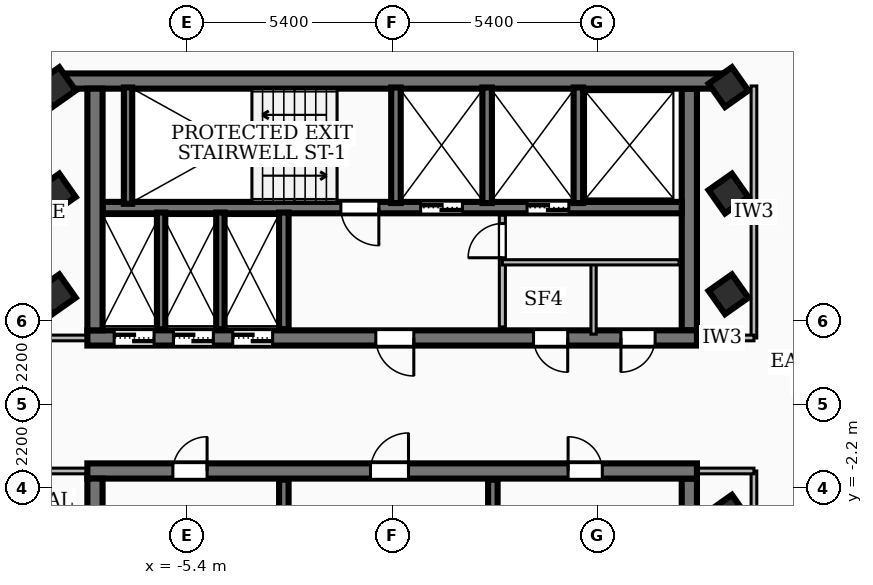
"""IFC4 building model, lengths in metres.
Left out: names, types, materials, properties, quantities, classifications, styles, units other than length and angle.
Written with IfcOpenShell. Run it as: python <this file> out.ifc"""

import sys

from ifc_helpers import new_model, si_unit, direction, frame, frame_2d, origin, origin_2d, place, context, subcontext, project, spatial, rectangle, extrude, element, fill, save


model = new_model("IFC4")
c1 = context("Model", 3, precision=1e-05, world=origin(), true_north=direction((0.0, 1.0)))
c2 = subcontext(c1, "Body", "Model", "MODEL_VIEW")
j1 = project(units=[si_unit("LENGTHUNIT", "METRE"), si_unit("PLANEANGLEUNIT", "RADIAN")], contexts=[c1])
p1 = place(None, origin())
s1 = spatial("IfcSite", under=j1, at=p1, CompositionType="ELEMENT")
p2 = place(p1, origin())
s2 = spatial("IfcBuilding", under=s1, at=p2, CompositionType="ELEMENT")
p3 = place(p2, frame((0.0, 0.0, 225.72)))
s3 = spatial("IfcBuildingStorey", under=s2, at=p3, CompositionType="ELEMENT", Elevation=225.72)
p4 = place(p3, frame((-8.78, 8.51, 0.0), z_axis=(0.0, 0.0, 1.0), x_axis=(1.0, 0.0, 0.0)))
e1 = element("IfcWall", 1, at=p4, inside=s3, PredefinedType="SHEAR", context=c2, shape_type="SweptSolid", body=[
    extrude(rectangle(XDim=17.56, YDim=0.4, at=frame_2d((8.78, 0.0))), origin(), (0.0, 0.0, 1.0), 3.14),
])
p5 = place(p3, frame((8.02, 1.75, 0.0), z_axis=(0.0, 0.0, 1.0), x_axis=(-1.0, 0.0, 0.0)))
e2 = element("IfcWall", 2, at=p5, inside=s3, PredefinedType="SHEAR", context=c2, shape_type="SweptSolid", body=[
    extrude(rectangle(XDim=16.04, YDim=0.4, at=frame_2d((8.02, 0.0))), origin(), (0.0, 0.0, 1.0), 3.14),
])
p6 = place(p5, frame((7.45, 0.0, 0.0)))
e3 = element("IfcOpeningElement", 3, at=p6, cuts=e2, PredefinedType="OPENING", context=c2, shape_type="SweptSolid", body=[
    extrude(rectangle(XDim=1.0, YDim=2.1, at=frame_2d((0.5, 1.05))), frame((0.0, 0.21, 0.0), z_axis=(0.0, -1.0, 0.0), x_axis=(1.0, 0.0, 0.0)), (0.0, 0.0, 1.0), 0.42),
])
p7 = place(p5, frame((14.285, 0.0, 0.0)))
e4 = element("IfcOpeningElement", 4, at=p7, cuts=e2, PredefinedType="OPENING", context=c2, shape_type="SweptSolid", body=[
    extrude(rectangle(XDim=1.05, YDim=2.15, at=frame_2d((0.525, 1.075))), frame((0.0, 0.21, 0.0), z_axis=(0.0, -1.0, 0.0), x_axis=(1.0, 0.0, 0.0)), (0.0, 0.0, 1.0), 0.42),
])
p8 = place(p5, frame((12.725, 0.0, 0.0)))
e5 = element("IfcOpeningElement", 5, at=p8, cuts=e2, PredefinedType="OPENING", context=c2, shape_type="SweptSolid", body=[
    extrude(rectangle(XDim=1.05, YDim=2.15, at=frame_2d((0.525, 1.075))), frame((0.0, 0.21, 0.0), z_axis=(0.0, -1.0, 0.0), x_axis=(1.0, 0.0, 0.0)), (0.0, 0.0, 1.0), 0.42),
])
p9 = place(p5, frame((11.165, 0.0, 0.0)))
e6 = element("IfcOpeningElement", 6, at=p9, cuts=e2, PredefinedType="OPENING", context=c2, shape_type="SweptSolid", body=[
    extrude(rectangle(XDim=1.05, YDim=2.15, at=frame_2d((0.525, 1.075))), frame((0.0, 0.21, 0.0), z_axis=(0.0, -1.0, 0.0), x_axis=(1.0, 0.0, 0.0)), (0.0, 0.0, 1.0), 0.42),
])
p10 = place(p5, frame((3.4, 0.0, 0.0)))
e7 = element("IfcOpeningElement", 7, at=p10, cuts=e2, PredefinedType="OPENING", context=c2, shape_type="SweptSolid", body=[
    extrude(rectangle(XDim=0.9, YDim=2.06, at=frame_2d((0.45, 1.03))), frame((0.0, 0.21, 0.0), z_axis=(0.0, -1.0, 0.0), x_axis=(1.0, 0.0, 0.0)), (0.0, 0.0, 1.0), 0.42),
])
p11 = place(p5, frame((1.1, 0.0, 0.0)))
e8 = element("IfcOpeningElement", 8, at=p11, cuts=e2, PredefinedType="OPENING", context=c2, shape_type="SweptSolid", body=[
    extrude(rectangle(XDim=0.9, YDim=2.06, at=frame_2d((0.45, 1.03))), frame((0.0, 0.21, 0.0), z_axis=(0.0, -1.0, 0.0), x_axis=(1.0, 0.0, 0.0)), (0.0, 0.0, 1.0), 0.42),
])
for number, where, z_axis, x_axis in (
    (9, (-7.82, 1.95, 0.0), (0.0, 0.0, 1.0), (0.0, 1.0, 0.0)),
    (10, (7.82, 8.31, 0.0), (0.0, 0.0, 1.0), (0.0, -1.0, 0.0)),
):
    element("IfcWall", number, at=place(p3, frame(where, z_axis=z_axis, x_axis=x_axis)), inside=s3, PredefinedType="SHEAR", context=c2, shape_type="SweptSolid", body=[
        extrude(rectangle(XDim=6.36, YDim=0.4, at=frame_2d((3.18, 0.0))), origin(), (0.0, 0.0, 1.0), 3.14),
    ])
p12 = place(p3, frame((7.62, 5.18, 0.0), z_axis=(0.0, 0.0, 1.0), x_axis=(-1.0, 0.0, 0.0)))
e11 = element("IfcWall", 11, at=p12, inside=s3, PredefinedType="SOLIDWALL", context=c2, shape_type="SweptSolid", body=[
    extrude(rectangle(XDim=15.24, YDim=0.3, at=frame_2d((7.62, 0.0))), origin(), (0.0, 0.0, 1.0), 3.14),
])
p13 = place(p12, frame((5.77, 0.0, 0.0)))
e12 = element("IfcOpeningElement", 12, at=p13, cuts=e11, PredefinedType="OPENING", context=c2, shape_type="SweptSolid", body=[
    extrude(rectangle(XDim=1.1, YDim=2.15, at=frame_2d((0.55, 1.075))), frame((0.0, 0.16, 0.0), z_axis=(0.0, -1.0, 0.0), x_axis=(1.0, 0.0, 0.0)), (0.0, 0.0, 1.0), 0.32),
])
p14 = place(p12, frame((2.97, 0.0, 0.0)))
e13 = element("IfcOpeningElement", 13, at=p14, cuts=e11, PredefinedType="OPENING", context=c2, shape_type="SweptSolid", body=[
    extrude(rectangle(XDim=1.1, YDim=2.15, at=frame_2d((0.55, 1.075))), frame((0.0, 0.16, 0.0), z_axis=(0.0, -1.0, 0.0), x_axis=(1.0, 0.0, 0.0)), (0.0, 0.0, 1.0), 0.32),
])
p15 = place(p12, frame((7.97, 0.0, 0.0)))
e14 = element("IfcOpeningElement", 14, at=p15, cuts=e11, PredefinedType="OPENING", context=c2, shape_type="SweptSolid", body=[
    extrude(rectangle(XDim=1.0, YDim=2.1, at=frame_2d((0.5, 1.05))), frame((0.0, 0.16, 0.0), z_axis=(0.0, -1.0, 0.0), x_axis=(1.0, 0.0, 0.0)), (0.0, 0.0, 1.0), 0.32),
])
p16 = place(p3, frame((-8.02, -1.75, 0.0), z_axis=(0.0, 0.0, 1.0), x_axis=(1.0, 0.0, 0.0)))
e15 = element("IfcWall", 15, at=p16, inside=s3, PredefinedType="SHEAR", context=c2, shape_type="SweptSolid", body=[
    extrude(rectangle(XDim=16.04, YDim=0.4, at=frame_2d((8.02, 0.0))), origin(), (0.0, 0.0, 1.0), 3.14),
])
p17 = place(p16, frame((7.45, 0.0, 0.0)))
e16 = element("IfcOpeningElement", 16, at=p17, cuts=e15, PredefinedType="OPENING", context=c2, shape_type="SweptSolid", body=[
    extrude(rectangle(XDim=1.0, YDim=2.1, at=frame_2d((0.5, 1.05))), frame((0.0, 0.21, 0.0), z_axis=(0.0, -1.0, 0.0), x_axis=(1.0, 0.0, 0.0)), (0.0, 0.0, 1.0), 0.42),
])
p18 = place(p16, frame((12.65, 0.0, 0.0)))
e17 = element("IfcOpeningElement", 17, at=p18, cuts=e15, PredefinedType="OPENING", context=c2, shape_type="SweptSolid", body=[
    extrude(rectangle(XDim=0.9, YDim=2.06, at=frame_2d((0.45, 1.03))), frame((0.0, 0.21, 0.0), z_axis=(0.0, -1.0, 0.0), x_axis=(1.0, 0.0, 0.0)), (0.0, 0.0, 1.0), 0.42),
])
p19 = place(p16, frame((2.25, 0.0, 0.0)))
e18 = element("IfcOpeningElement", 18, at=p19, cuts=e15, PredefinedType="OPENING", context=c2, shape_type="SweptSolid", body=[
    extrude(rectangle(XDim=0.9, YDim=2.06, at=frame_2d((0.45, 1.03))), frame((0.0, 0.21, 0.0), z_axis=(0.0, -1.0, 0.0), x_axis=(1.0, 0.0, 0.0)), (0.0, 0.0, 1.0), 0.42),
])
for number, where, z_axis, x_axis in (
    (19, (-7.82, -8.31, 0.0), (0.0, 0.0, 1.0), (0.0, 1.0, 0.0)),
    (20, (7.82, -1.95, 0.0), (0.0, 0.0, 1.0), (0.0, -1.0, 0.0)),
):
    element("IfcWall", number, at=place(p3, frame(where, z_axis=z_axis, x_axis=x_axis)), inside=s3, PredefinedType="SHEAR", context=c2, shape_type="SweptSolid", body=[
        extrude(rectangle(XDim=6.36, YDim=0.4, at=frame_2d((3.18, 0.0))), origin(), (0.0, 0.0, 1.0), 3.14),
    ])
p20 = place(p3, frame((-6.95, 5.28, 0.0), z_axis=(0.0, 0.0, 1.0), x_axis=(0.0, 1.0, 0.0)))
e21 = element("IfcWall", 21, at=p20, inside=s3, PredefinedType="SOLIDWALL", context=c2, shape_type="SweptSolid", body=[
    extrude(rectangle(XDim=3.06, YDim=0.22, at=frame_2d((1.53, 0.0))), origin(), (0.0, 0.0, 1.0), 3.14),
])
for number, where, z_axis, x_axis in (
    (22, (0.1, 5.3, 0.0), (0.0, 0.0, 1.0), (0.0, 1.0, 0.0)),
    (23, (2.5, 5.3, 0.0), (0.0, 0.0, 1.0), (0.0, 1.0, 0.0)),
    (24, (4.9, 5.3, 0.0), (0.0, 0.0, 1.0), (0.0, 1.0, 0.0)),
):
    element("IfcWall", number, at=place(p3, frame(where, z_axis=z_axis, x_axis=x_axis)), inside=s3, PredefinedType="SOLIDWALL", context=c2, shape_type="SweptSolid", body=[
        extrude(rectangle(XDim=3.04, YDim=0.25, at=frame_2d((1.52, 0.0))), origin(), (0.0, 0.0, 1.0), 3.14),
    ])
for number, where, z_axis, x_axis in (
    (25, (-2.85, 1.98, 0.0), (0.0, 0.0, 1.0), (0.0, 1.0, 0.0)),
    (26, (-2.85, -5.05, 0.0), (0.0, 0.0, 1.0), (0.0, 1.0, 0.0)),
    (27, (2.65, -5.05, 0.0), (0.0, 0.0, 1.0), (0.0, 1.0, 0.0)),
):
    element("IfcWall", number, at=place(p3, frame(where, z_axis=z_axis, x_axis=x_axis)), inside=s3, PredefinedType="SOLIDWALL", context=c2, shape_type="SweptSolid", body=[
        extrude(rectangle(XDim=3.07, YDim=0.25, at=frame_2d((1.535, 0.0))), origin(), (0.0, 0.0, 1.0), 3.14),
    ])
for number, where, z_axis, x_axis in (
    (28, (-6.08, 1.98, 0.0), (0.0, 0.0, 1.0), (0.0, 1.0, 0.0)),
    (29, (-4.52, 1.98, 0.0), (0.0, 0.0, 1.0), (0.0, 1.0, 0.0)),
):
    element("IfcWall", number, at=place(p3, frame(where, z_axis=z_axis, x_axis=x_axis)), inside=s3, PredefinedType="SOLIDWALL", context=c2, shape_type="SweptSolid", body=[
        extrude(rectangle(XDim=3.07, YDim=0.22, at=frame_2d((1.535, 0.0))), origin(), (0.0, 0.0, 1.0), 3.14),
    ])
for number, where, z_axis, x_axis in (
    (30, (-8.85, -2.9, 0.0), (0.0, 0.0, 1.0), (0.817, 0.576, 0.0)),
    (31, (-8.85, 2.9, 0.0), (0.0, 0.0, 1.0), (0.817, 0.576, 0.0)),
    (32, (-8.85, 5.55, 0.0), (0.0, 0.0, 1.0), (0.817, 0.576, 0.0)),
    (33, (8.85, -2.9, 0.0), (0.0, 0.0, 1.0), (0.817, 0.576, 0.0)),
    (34, (8.85, 2.9, 0.0), (0.0, 0.0, 1.0), (0.817, 0.576, 0.0)),
    (35, (8.85, 5.55, 0.0), (0.0, 0.0, 1.0), (0.817, 0.576, 0.0)),
    (36, (-8.85, 8.35, 0.0), (0.0, 0.0, 1.0), (0.817, 0.576, 0.0)),
    (37, (8.85, 8.35, 0.0), (0.0, 0.0, 1.0), (0.817, 0.576, 0.0)),
):
    element("IfcColumn", number, at=place(p3, frame(where, z_axis=z_axis, x_axis=x_axis)), inside=s3, PredefinedType="COLUMN", context=c2, shape_type="SweptSolid", body=[
        extrude(rectangle(XDim=0.75, YDim=0.75, at=origin_2d()), origin(), (0.0, 0.0, 1.0), 3.42),
    ])
p21 = place(p3, frame((-4.337, -18.921, 0.0), z_axis=(0.0, 0.0, 1.0), x_axis=(-0.576413609547, 0.817158094085, 0.0)))
e38 = element("IfcWall", 38, at=p21, inside=s3, PredefinedType="SOLIDWALL", context=c2, shape_type="SweptSolid", body=[
    extrude(rectangle(XDim=25.923, YDim=0.2, at=frame_2d((12.961, 0.0))), origin(), (0.0, 0.0, 1.0), 3.14),
])
p22 = place(p21, frame((19.02, 0.0, 0.85)))
e39 = element("IfcOpeningElement", 39, at=p22, cuts=e38, PredefinedType="OPENING", context=c2, shape_type="SweptSolid", body=[
    extrude(rectangle(XDim=2.4, YDim=1.65, at=frame_2d((1.2, 0.825))), frame((0.0, 0.11, 0.0), z_axis=(0.0, -1.0, 0.0), x_axis=(1.0, 0.0, 0.0)), (0.0, 0.0, 1.0), 0.22),
])
p23 = place(p3, frame((2.9, 2.04, 0.0), z_axis=(0.0, 0.0, 1.0), x_axis=(0.0, 1.0, 0.0)))
e40 = element("IfcWall", 40, at=p23, inside=s3, PredefinedType="PARTITIONING", context=c2, shape_type="SweptSolid", body=[
    extrude(rectangle(XDim=2.94, YDim=0.16, at=frame_2d((1.47, 0.0))), origin(), (0.0, 0.0, 1.0), 2.37),
])
p24 = place(p23, frame((1.82, 0.0, 0.0)))
e41 = element("IfcOpeningElement", 41, at=p24, cuts=e40, PredefinedType="OPENING", context=c2, shape_type="SweptSolid", body=[
    extrude(rectangle(XDim=0.9, YDim=2.06, at=frame_2d((0.45, 1.03))), frame((0.0, 0.09, 0.0), z_axis=(0.0, -1.0, 0.0), x_axis=(1.0, 0.0, 0.0)), (0.0, 0.0, 1.0), 0.18),
])
p25 = place(p3, frame((2.9, 3.74, 0.0), z_axis=(0.0, 0.0, 1.0), x_axis=(1.0, 0.0, 0.0)))
e42 = element("IfcWall", 42, at=p25, inside=s3, PredefinedType="PARTITIONING", context=c2, shape_type="SweptSolid", body=[
    extrude(rectangle(XDim=4.65, YDim=0.138, at=frame_2d((2.325, 0.0))), origin(), (0.0, 0.0, 1.0), 3.14),
])
p26 = place(p3, frame((5.3, 1.85, 0.0), z_axis=(0.0, 0.0, 1.0), x_axis=(0.0, 1.0, 0.0)))
e43 = element("IfcWall", 43, at=p26, inside=s3, PredefinedType="PARTITIONING", context=c2, shape_type="SweptSolid", body=[
    extrude(rectangle(XDim=1.89, YDim=0.138, at=frame_2d((0.945, 0.0))), origin(), (0.0, 0.0, 1.0), 2.37),
])
for number, where, z_axis, x_axis in (
    (44, (-7.85, 1.75, 0.0), (0.0, 0.0, 1.0), (-1.0, 0.0, 0.0)),
    (45, (-7.85, -1.75, 0.0), (0.0, 0.0, 1.0), (-1.0, 0.0, 0.0)),
):
    element("IfcWall", number, at=place(p3, frame(where, z_axis=z_axis, x_axis=x_axis)), inside=s3, PredefinedType="PARTITIONING", context=c2, shape_type="SweptSolid", body=[
        extrude(rectangle(XDim=1.67, YDim=0.15, at=frame_2d((0.835, 0.0))), origin(), (0.0, 0.0, 1.0), 2.37),
    ])
p27 = place(p3, frame((9.52, 1.75, 0.0), z_axis=(0.0, 0.0, 1.0), x_axis=(0.0, 1.0, 0.0)))
e46 = element("IfcWall", 46, at=p27, inside=s3, PredefinedType="PARTITIONING", context=c2, shape_type="SweptSolid", body=[
    extrude(rectangle(XDim=6.63, YDim=0.15, at=frame_2d((3.315, 0.0))), origin(), (0.0, 0.0, 1.0), 2.51),
])
p28 = place(p3, frame((7.85, 1.75, 0.0), z_axis=(0.0, 0.0, 1.0), x_axis=(1.0, 0.0, 0.0)))
e47 = element("IfcWall", 47, at=p28, inside=s3, PredefinedType="PARTITIONING", context=c2, shape_type="SweptSolid", body=[
    extrude(rectangle(XDim=1.67, YDim=0.15, at=frame_2d((0.835, 0.0))), origin(), (0.0, 0.0, 1.0), 2.37),
])
p29 = place(p3, frame((9.52, -8.38, 0.0), z_axis=(0.0, 0.0, 1.0), x_axis=(0.0, 1.0, 0.0)))
e48 = element("IfcWall", 48, at=p29, inside=s3, PredefinedType="PARTITIONING", context=c2, shape_type="SweptSolid", body=[
    extrude(rectangle(XDim=6.63, YDim=0.15, at=frame_2d((3.315, 0.0))), origin(), (0.0, 0.0, 1.0), 3.14),
])
p30 = place(p3, frame((7.85, -1.75, 0.0), z_axis=(0.0, 0.0, 1.0), x_axis=(1.0, 0.0, 0.0)))
e49 = element("IfcWall", 49, at=p30, inside=s3, PredefinedType="PARTITIONING", context=c2, shape_type="SweptSolid", body=[
    extrude(rectangle(XDim=1.67, YDim=0.15, at=frame_2d((0.835, 0.0))), origin(), (0.0, 0.0, 1.0), 2.37),
])
p31 = place(p3, frame((10.215, 14.836, 0.0), z_axis=(0.0, 0.0, 1.0), x_axis=(0.576525296339, -0.817079300118, 0.0)))
e50 = element("IfcWall", 50, at=p31, inside=s3, PredefinedType="PARTITIONING", context=c2, shape_type="SweptSolid", body=[
    extrude(rectangle(XDim=12.87, YDim=0.11, at=frame_2d((6.435, 0.0))), origin(), (0.0, 0.0, 1.0), 2.51),
])
p32 = place(p31, frame((6.155, 0.0, 0.0)))
e51 = element("IfcOpeningElement", 51, at=p32, cuts=e50, PredefinedType="OPENING", context=c2, shape_type="SweptSolid", body=[
    extrude(rectangle(XDim=0.86, YDim=2.04, at=frame_2d((0.43, 1.02))), frame((0.0, 0.065, 0.0), z_axis=(0.0, -1.0, 0.0), x_axis=(1.0, 0.0, 0.0)), (0.0, 0.0, 1.0), 0.13),
])
p33 = place(p31, frame((4.955, 0.0, 0.0)))
e52 = element("IfcOpeningElement", 52, at=p33, cuts=e50, PredefinedType="OPENING", context=c2, shape_type="SweptSolid", body=[
    extrude(rectangle(XDim=0.86, YDim=2.04, at=frame_2d((0.43, 1.02))), frame((0.0, 0.065, 0.0), z_axis=(0.0, -1.0, 0.0), x_axis=(1.0, 0.0, 0.0)), (0.0, 0.0, 1.0), 0.13),
])
p34 = place(p3, frame((-16.752, 5.671, 0.0), z_axis=(0.0, 0.0, 1.0), x_axis=(0.81715881447, 0.576412588285, 0.0)))
e53 = element("IfcWall", 53, at=p34, inside=s3, PredefinedType="PARTITIONING", context=c2, shape_type="SweptSolid", body=[
    extrude(rectangle(XDim=20.44, YDim=0.11, at=frame_2d((10.22, 0.0))), origin(), (0.0, 0.0, 1.0), 2.51),
])
p35 = place(p34, frame((9.82, 0.0, 0.0)))
e54 = element("IfcOpeningElement", 54, at=p35, cuts=e53, PredefinedType="OPENING", context=c2, shape_type="SweptSolid", body=[
    extrude(rectangle(XDim=1.2, YDim=2.1, at=frame_2d((0.6, 1.05))), frame((0.0, 0.065, 0.0), z_axis=(0.0, -1.0, 0.0), x_axis=(1.0, 0.0, 0.0)), (0.0, 0.0, 1.0), 0.13),
])
p36 = place(p6, origin())
e55 = element("IfcDoor", 55, at=p36, inside=s3, OperationType="SINGLE_SWING_LEFT", PredefinedType="DOOR", context=c2, shape_type="SweptSolid", body=[
    extrude(rectangle(XDim=1.0, YDim=2.1, at=frame_2d((0.5, 1.05))), frame((0.0, 0.025, 0.0), z_axis=(0.0, -1.0, 0.0), x_axis=(1.0, 0.0, 0.0)), (0.0, 0.0, 1.0), 0.05),
])
fill(e3, e55)
p37 = place(p17, origin())
e56 = element("IfcDoor", 56, at=p37, inside=s3, OperationType="SINGLE_SWING_RIGHT", PredefinedType="DOOR", context=c2, shape_type="SweptSolid", body=[
    extrude(rectangle(XDim=1.0, YDim=2.1, at=frame_2d((0.5, 1.05))), frame((0.0, 0.025, 0.0), z_axis=(0.0, -1.0, 0.0), x_axis=(1.0, 0.0, 0.0)), (0.0, 0.0, 1.0), 0.05),
])
fill(e16, e56)
p38 = place(p13, origin())
e57 = element("IfcDoor", 57, at=p38, inside=s3, OperationType="DOUBLE_DOOR_SLIDING", PredefinedType="DOOR", context=c2, shape_type="SweptSolid", body=[
    extrude(rectangle(XDim=1.1, YDim=2.15, at=frame_2d((0.55, 1.075))), frame((0.0, 0.025, 0.0), z_axis=(0.0, -1.0, 0.0), x_axis=(1.0, 0.0, 0.0)), (0.0, 0.0, 1.0), 0.05),
])
fill(e12, e57)
p39 = place(p14, origin())
e58 = element("IfcDoor", 58, at=p39, inside=s3, OperationType="DOUBLE_DOOR_SLIDING", PredefinedType="DOOR", context=c2, shape_type="SweptSolid", body=[
    extrude(rectangle(XDim=1.1, YDim=2.15, at=frame_2d((0.55, 1.075))), frame((0.0, 0.025, 0.0), z_axis=(0.0, -1.0, 0.0), x_axis=(1.0, 0.0, 0.0)), (0.0, 0.0, 1.0), 0.05),
])
fill(e13, e58)
p40 = place(p15, origin())
e59 = element("IfcDoor", 59, at=p40, inside=s3, OperationType="SINGLE_SWING_LEFT", PredefinedType="DOOR", context=c2, shape_type="SweptSolid", body=[
    extrude(rectangle(XDim=1.0, YDim=2.1, at=frame_2d((0.5, 1.05))), frame((0.0, 0.025, 0.0), z_axis=(0.0, -1.0, 0.0), x_axis=(1.0, 0.0, 0.0)), (0.0, 0.0, 1.0), 0.05),
])
fill(e14, e59)
p41 = place(p7, origin())
e60 = element("IfcDoor", 60, at=p41, inside=s3, OperationType="DOUBLE_DOOR_SLIDING", PredefinedType="DOOR", context=c2, shape_type="SweptSolid", body=[
    extrude(rectangle(XDim=1.05, YDim=2.15, at=frame_2d((0.525, 1.075))), frame((0.0, 0.025, 0.0), z_axis=(0.0, -1.0, 0.0), x_axis=(1.0, 0.0, 0.0)), (0.0, 0.0, 1.0), 0.05),
])
fill(e4, e60)
p42 = place(p8, origin())
e61 = element("IfcDoor", 61, at=p42, inside=s3, OperationType="DOUBLE_DOOR_SLIDING", PredefinedType="DOOR", context=c2, shape_type="SweptSolid", body=[
    extrude(rectangle(XDim=1.05, YDim=2.15, at=frame_2d((0.525, 1.075))), frame((0.0, 0.025, 0.0), z_axis=(0.0, -1.0, 0.0), x_axis=(1.0, 0.0, 0.0)), (0.0, 0.0, 1.0), 0.05),
])
fill(e5, e61)
p43 = place(p9, origin())
e62 = element("IfcDoor", 62, at=p43, inside=s3, OperationType="DOUBLE_DOOR_SLIDING", PredefinedType="DOOR", context=c2, shape_type="SweptSolid", body=[
    extrude(rectangle(XDim=1.05, YDim=2.15, at=frame_2d((0.525, 1.075))), frame((0.0, 0.025, 0.0), z_axis=(0.0, -1.0, 0.0), x_axis=(1.0, 0.0, 0.0)), (0.0, 0.0, 1.0), 0.05),
])
fill(e6, e62)
p44 = place(p18, origin())
e63 = element("IfcDoor", 63, at=p44, inside=s3, OperationType="SINGLE_SWING_LEFT", PredefinedType="DOOR", context=c2, shape_type="SweptSolid", body=[
    extrude(rectangle(XDim=0.9, YDim=2.06, at=frame_2d((0.45, 1.03))), frame((0.0, 0.025, 0.0), z_axis=(0.0, -1.0, 0.0), x_axis=(1.0, 0.0, 0.0)), (0.0, 0.0, 1.0), 0.05),
])
fill(e17, e63)
p45 = place(p19, origin())
e64 = element("IfcDoor", 64, at=p45, inside=s3, OperationType="SINGLE_SWING_RIGHT", PredefinedType="DOOR", context=c2, shape_type="SweptSolid", body=[
    extrude(rectangle(XDim=0.9, YDim=2.06, at=frame_2d((0.45, 1.03))), frame((0.0, 0.025, 0.0), z_axis=(0.0, -1.0, 0.0), x_axis=(1.0, 0.0, 0.0)), (0.0, 0.0, 1.0), 0.05),
])
fill(e18, e64)
p46 = place(p10, origin())
e65 = element("IfcDoor", 65, at=p46, inside=s3, OperationType="SINGLE_SWING_LEFT", PredefinedType="DOOR", context=c2, shape_type="SweptSolid", body=[
    extrude(rectangle(XDim=0.9, YDim=2.06, at=frame_2d((0.45, 1.03))), frame((0.0, 0.025, 0.0), z_axis=(0.0, -1.0, 0.0), x_axis=(1.0, 0.0, 0.0)), (0.0, 0.0, 1.0), 0.05),
])
fill(e7, e65)
p47 = place(p11, origin())
e66 = element("IfcDoor", 66, at=p47, inside=s3, OperationType="SINGLE_SWING_RIGHT", PredefinedType="DOOR", context=c2, shape_type="SweptSolid", body=[
    extrude(rectangle(XDim=0.9, YDim=2.06, at=frame_2d((0.45, 1.03))), frame((0.0, 0.025, 0.0), z_axis=(0.0, -1.0, 0.0), x_axis=(1.0, 0.0, 0.0)), (0.0, 0.0, 1.0), 0.05),
])
fill(e8, e66)
p48 = place(p24, origin())
e67 = element("IfcDoor", 67, at=p48, inside=s3, OperationType="SINGLE_SWING_LEFT", PredefinedType="DOOR", context=c2, shape_type="SweptSolid", body=[
    extrude(rectangle(XDim=0.9, YDim=2.06, at=frame_2d((0.45, 1.03))), frame((0.0, 0.025, 0.0), z_axis=(0.0, -1.0, 0.0), x_axis=(1.0, 0.0, 0.0)), (0.0, 0.0, 1.0), 0.05),
])
fill(e41, e67)
save(model, sys.argv[1])
